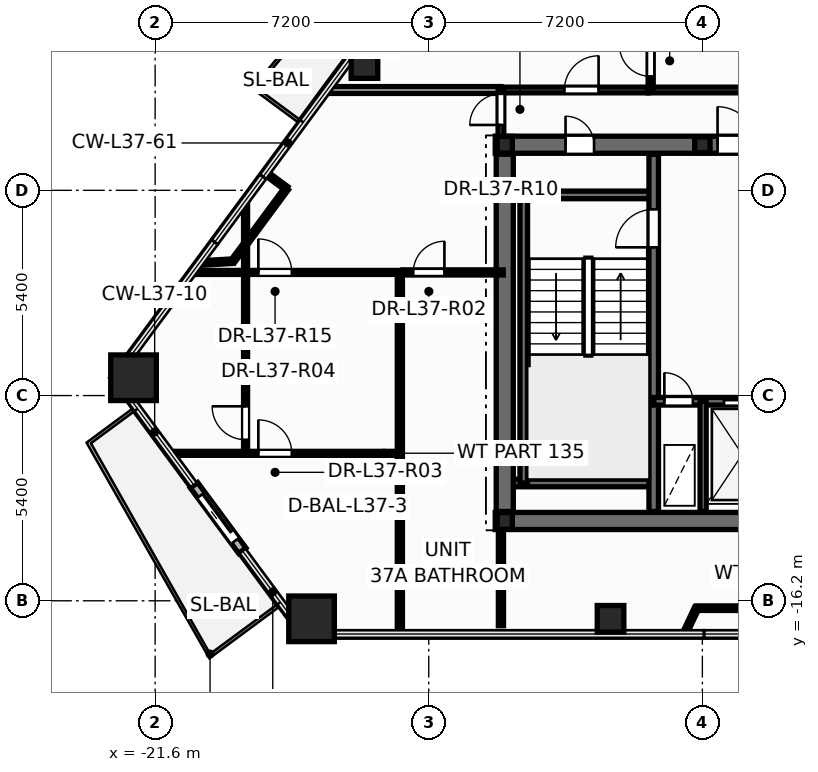
"""IFC4 building model, lengths in metres.
Left out: names, types, materials, properties, quantities, classifications, styles, units other than length and angle.
Written with IfcOpenShell. Run it as: python <this file> out.ifc"""

import sys

from ifc_helpers import new_model, si_unit, direction, frame, frame_2d, origin, origin_2d, place, context, subcontext, project, spatial, rectangle, hollow_rectangle, hollow_circle, i_section, extrude, element, fill, save


model = new_model("IFC4")
c1 = context("Model", 3, precision=1e-05, world=origin(), true_north=direction((0.0, 1.0)))
c2 = subcontext(c1, "Body", "Model", "MODEL_VIEW")
j1 = project(units=[si_unit("LENGTHUNIT", "METRE"), si_unit("PLANEANGLEUNIT", "RADIAN")], contexts=[c1])
p1 = place(None, origin())
s1 = spatial("IfcSite", under=j1, at=p1, CompositionType="ELEMENT")
p2 = place(p1, origin())
s2 = spatial("IfcBuilding", under=s1, at=p2, CompositionType="ELEMENT")
p3 = place(p2, frame((0.0, 0.0, 143.7)))
s3 = spatial("IfcBuildingStorey", under=s2, at=p3, CompositionType="ELEMENT", Elevation=143.7)
for number, where, z_axis, x_axis in (
    (1, (-22.168, -10.331, 0.0), (0.0, 0.0, 1.0), (1.0, 0.0, 0.0)),
    (2, (-17.484, -16.674, 0.0), (0.0, 0.0, 1.0), (1.0, 0.0, 0.0)),
):
    element("IfcColumn", number, at=place(p3, frame(where, z_axis=z_axis, x_axis=x_axis)), inside=s3, PredefinedType="COLUMN", context=c2, shape_type="SweptSolid", body=[
        extrude(hollow_rectangle(XDim=1.2, YDim=1.2, WallThickness=0.055, at=origin_2d()), origin(), (0.0, 0.0, 1.0), 3.6),
    ])
for number, where, z_axis, x_axis in (
    (3, (-9.616, -16.674, 0.0), (0.0, 0.0, 1.0), (1.0, 0.0, 0.0)),
    (4, (-16.092, -2.103, 0.0), (0.0, 0.0, 1.0), (1.0, 0.0, 0.0)),
):
    element("IfcColumn", number, at=place(p3, frame(where, z_axis=z_axis, x_axis=x_axis)), inside=s3, PredefinedType="COLUMN", context=c2, shape_type="SweptSolid", body=[
        extrude(hollow_circle(Radius=0.35, WallThickness=0.03, at=origin_2d()), origin(), (0.0, 0.0, 1.0), 3.6),
    ])
for number, where, z_axis, x_axis in (
    (5, (-12.4, -14.1, 0.0), (0.0, 0.0, 1.0), (1.0, 0.0, 0.0)),
    (6, (-12.4, -4.2, 0.0), (0.0, 0.0, 1.0), (1.0, 0.0, 0.0)),
):
    element("IfcColumn", number, at=place(p3, frame(where, z_axis=z_axis, x_axis=x_axis)), inside=s3, PredefinedType="COLUMN", context=c2, shape_type="SweptSolid", body=[
        extrude(i_section(OverallWidth=0.4, OverallDepth=0.44, WebThickness=0.028, FlangeThickness=0.04, at=origin_2d()), origin(), (0.0, 0.0, 1.0), 3.6),
    ])
p4 = place(p3, frame((-7.2, -4.2, 0.0), z_axis=(0.0, 0.0, 1.0), x_axis=(1.0, 0.0, 0.0)))
e7 = element("IfcColumn", 7, at=p4, inside=s3, PredefinedType="PILASTER", context=c2, shape_type="SweptSolid", body=[
    extrude(i_section(OverallWidth=0.405, OverallDepth=0.414, WebThickness=0.022, FlangeThickness=0.032, at=origin_2d()), origin(), (0.0, 0.0, 1.0), 3.6),
])
p5 = place(p3, frame((-20.577, -13.159, -0.015), z_axis=(0.0, 0.0, 1.0), x_axis=(0.59407028248, -0.804413139794, 0.0)))
e8 = element("IfcWall", 8, at=p5, inside=s3, PredefinedType="STANDARD", context=c2, shape_type="SweptSolid", body=[
    extrude(rectangle(XDim=2.14, YDim=0.24, at=frame_2d((1.07, 0.0))), origin(), (0.0, 0.0, 1.0), 2.807),
])
p6 = place(p5, frame((0.32, 0.0, 0.015)))
e9 = element("IfcOpeningElement", 9, at=p6, cuts=e8, PredefinedType="OPENING", context=c2, shape_type="SweptSolid", body=[
    extrude(rectangle(XDim=1.506, YDim=2.204, at=frame_2d((0.75, 1.102))), frame((0.0, 0.13, 0.0), z_axis=(0.0, -1.0, 0.0), x_axis=(1.0, 0.0, 0.0)), (0.0, 0.0, 1.0), 0.26),
])
p7 = place(p3, frame((-12.65, -14.1, 0.0), z_axis=(0.0, 0.0, 1.0), x_axis=(1.0, 0.0, 0.0)))
e10 = element("IfcWall", 10, at=p7, inside=s3, PredefinedType="SHEAR", context=c2, shape_type="SweptSolid", body=[
    extrude(rectangle(XDim=25.3, YDim=0.45, at=frame_2d((12.65, 0.0))), origin(), (0.0, 0.0, 1.0), 3.6),
])
p8 = place(p3, frame((-12.65, -4.2, 0.0), z_axis=(0.0, 0.0, 1.0), x_axis=(1.0, 0.0, 0.0)))
e11 = element("IfcWall", 11, at=p8, inside=s3, PredefinedType="SHEAR", context=c2, shape_type="SweptSolid", body=[
    extrude(rectangle(XDim=25.3, YDim=0.45, at=frame_2d((12.65, 0.0))), origin(), (0.0, 0.0, 1.0), 3.6),
])
p9 = place(p8, frame((1.85, 0.0, 0.0)))
e12 = element("IfcOpeningElement", 12, at=p9, cuts=e11, PredefinedType="OPENING", context=c2, shape_type="SweptSolid", body=[
    extrude(rectangle(XDim=0.756, YDim=2.054, at=frame_2d((0.375, 1.027))), frame((0.0, 0.235, 0.0), z_axis=(0.0, -1.0, 0.0), x_axis=(1.0, 0.0, 0.0)), (0.0, 0.0, 1.0), 0.47),
])
p10 = place(p8, frame((21.85, 0.0, 0.0)))
e13 = element("IfcOpeningElement", 13, at=p10, cuts=e11, PredefinedType="OPENING", context=c2, shape_type="SweptSolid", body=[
    extrude(rectangle(XDim=0.756, YDim=2.054, at=frame_2d((0.375, 1.027))), frame((0.0, 0.235, 0.0), z_axis=(0.0, -1.0, 0.0), x_axis=(1.0, 0.0, 0.0)), (0.0, 0.0, 1.0), 0.47),
])
p11 = place(p8, frame((23.5, 0.0, 0.0)))
e14 = element("IfcOpeningElement", 14, at=p11, cuts=e11, PredefinedType="OPENING", context=c2, shape_type="SweptSolid", body=[
    extrude(rectangle(XDim=0.756, YDim=2.054, at=frame_2d((0.375, 1.027))), frame((0.0, 0.235, 0.0), z_axis=(0.0, -1.0, 0.0), x_axis=(1.0, 0.0, 0.0)), (0.0, 0.0, 1.0), 0.47),
])
p12 = place(p8, frame((5.85, 0.0, 0.0)))
e15 = element("IfcOpeningElement", 15, at=p12, cuts=e11, PredefinedType="OPENING", context=c2, shape_type="SweptSolid", body=[
    extrude(rectangle(XDim=1.006, YDim=2.104, at=frame_2d((0.5, 1.052))), frame((0.0, 0.235, 0.0), z_axis=(0.0, -1.0, 0.0), x_axis=(1.0, 0.0, 0.0)), (0.0, 0.0, 1.0), 0.47),
])
p13 = place(p8, frame((10.35, 0.0, 0.0)))
e16 = element("IfcOpeningElement", 16, at=p13, cuts=e11, PredefinedType="OPENING", context=c2, shape_type="SweptSolid", body=[
    extrude(rectangle(XDim=1.406, YDim=2.154, at=frame_2d((0.7, 1.077))), frame((0.0, 0.235, 0.0), z_axis=(0.0, -1.0, 0.0), x_axis=(1.0, 0.0, 0.0)), (0.0, 0.0, 1.0), 0.47),
])
p14 = place(p8, frame((18.45, 0.0, 0.0)))
e17 = element("IfcOpeningElement", 17, at=p14, cuts=e11, PredefinedType="OPENING", context=c2, shape_type="SweptSolid", body=[
    extrude(rectangle(XDim=1.006, YDim=2.104, at=frame_2d((0.5, 1.052))), frame((0.0, 0.235, 0.0), z_axis=(0.0, -1.0, 0.0), x_axis=(1.0, 0.0, 0.0)), (0.0, 0.0, 1.0), 0.47),
])
for number, where, z_axis, x_axis in (
    (18, (-12.35, -5.52, 0.0), (0.0, 0.0, 1.0), (1.0, 0.0, 0.0)),
    (19, (-12.35, -13.1, 0.0), (0.0, 0.0, 1.0), (1.0, 0.0, 0.0)),
):
    element("IfcWall", number, at=place(p3, frame(where, z_axis=z_axis, x_axis=x_axis)), inside=s3, PredefinedType="SOLIDWALL", context=c2, shape_type="SweptSolid", body=[
        extrude(rectangle(XDim=3.87, YDim=0.2, at=frame_2d((1.935, 0.0))), origin(), (0.0, 0.0, 1.0), 3.6),
    ])
p15 = place(p3, frame((-11.9, -13.1, 0.0), z_axis=(0.0, 0.0, 1.0), x_axis=(0.0, 1.0, 0.0)))
e20 = element("IfcWall", 20, at=p15, inside=s3, PredefinedType="SOLIDWALL", context=c2, shape_type="SweptSolid", body=[
    extrude(rectangle(XDim=7.58, YDim=0.2, at=frame_2d((3.79, 0.0))), origin(), (0.0, 0.0, 1.0), 3.6),
])
p16 = place(p3, frame((-8.48, -13.85, 0.0), z_axis=(0.0, 0.0, 1.0), x_axis=(0.0, 1.0, 0.0)))
e21 = element("IfcWall", 21, at=p16, inside=s3, PredefinedType="SHEAR", context=c2, shape_type="SweptSolid", body=[
    extrude(rectangle(XDim=9.4, YDim=0.25, at=frame_2d((4.7, 0.0))), origin(), (0.0, 0.0, 1.0), 3.6),
])
p17 = place(p16, frame((6.95, 0.0, 0.0)))
e22 = element("IfcOpeningElement", 22, at=p17, cuts=e21, PredefinedType="OPENING", context=c2, shape_type="SweptSolid", body=[
    extrude(rectangle(XDim=1.006, YDim=2.104, at=frame_2d((0.5, 1.052))), frame((0.0, 0.135, 0.0), z_axis=(0.0, -1.0, 0.0), x_axis=(1.0, 0.0, 0.0)), (0.0, 0.0, 1.0), 0.27),
])
p18 = place(p3, frame((-8.48, -10.95, 0.0), z_axis=(0.0, 0.0, 1.0), x_axis=(1.0, 0.0, 0.0)))
e23 = element("IfcWall", 23, at=p18, inside=s3, PredefinedType="SOLIDWALL", context=c2, shape_type="SweptSolid", body=[
    extrude(rectangle(XDim=3.36, YDim=0.2, at=frame_2d((1.68, 0.0))), origin(), (0.0, 0.0, 1.0), 3.6),
])
p19 = place(p18, frame((0.28, 0.0, 0.0)))
e24 = element("IfcOpeningElement", 24, at=p19, cuts=e23, PredefinedType="OPENING", context=c2, shape_type="SweptSolid", body=[
    extrude(rectangle(XDim=0.756, YDim=2.054, at=frame_2d((0.375, 1.027))), frame((0.0, 0.11, 0.0), z_axis=(0.0, -1.0, 0.0), x_axis=(1.0, 0.0, 0.0)), (0.0, 0.0, 1.0), 0.22),
])
p20 = place(p18, frame((1.85, 0.0, 0.0)))
e25 = element("IfcOpeningElement", 25, at=p20, cuts=e23, PredefinedType="OPENING", context=c2, shape_type="SweptSolid", body=[
    extrude(rectangle(XDim=1.106, YDim=2.104, at=frame_2d((0.55, 1.052))), frame((0.0, 0.11, 0.0), z_axis=(0.0, -1.0, 0.0), x_axis=(1.0, 0.0, 0.0)), (0.0, 0.0, 1.0), 0.22),
])
p21 = place(p3, frame((-7.18, -13.85, 0.0), z_axis=(0.0, 0.0, 1.0), x_axis=(0.0, 1.0, 0.0)))
e26 = element("IfcWall", 26, at=p21, inside=s3, PredefinedType="PARTITIONING", context=c2, shape_type="SweptSolid", body=[
    extrude(rectangle(XDim=2.9, YDim=0.16, at=frame_2d((1.45, 0.0))), origin(), (0.0, 0.0, 1.0), 2.475),
])
p22 = place(p3, frame((-12.4, -13.85, 0.0), z_axis=(0.0, 0.0, 1.0), x_axis=(0.0, 1.0, 0.0)))
e27 = element("IfcWall", 27, at=p22, inside=s3, PredefinedType="SHEAR", context=c2, shape_type="SweptSolid", body=[
    extrude(rectangle(XDim=9.4, YDim=0.45, at=frame_2d((4.7, 0.0))), origin(), (0.0, 0.0, 1.0), 3.6),
])
p23 = place(p3, frame((-8.62, -2.76, 0.0), z_axis=(0.0, 0.0, 1.0), x_axis=(1.0, 0.0, 0.0)))
e28 = element("IfcWall", 28, at=p23, inside=s3, PredefinedType="PARTITIONING", context=c2, shape_type="SweptSolid", body=[
    extrude(rectangle(XDim=9.26, YDim=0.15, at=frame_2d((4.63, 0.0))), origin(), (0.0, 0.0, 1.0), 2.325),
])
p24 = place(p3, frame((-19.22, -12.32, 0.0), z_axis=(0.0, 0.0, 1.0), x_axis=(0.0, 1.0, 0.0)))
e29 = element("IfcWall", 29, at=p24, inside=s3, PredefinedType="PARTITIONING", context=c2, shape_type="SweptSolid", body=[
    extrude(rectangle(XDim=6.654, YDim=0.105, at=frame_2d((3.327, 0.0))), origin(), (0.0, 0.0, 1.0), 2.325),
])
p25 = place(p24, frame((0.357, 0.0, 0.0)))
e30 = element("IfcOpeningElement", 30, at=p25, cuts=e29, PredefinedType="OPENING", context=c2, shape_type="SweptSolid", body=[
    extrude(rectangle(XDim=0.886, YDim=2.104, at=frame_2d((0.44, 1.052))), frame((0.0, 0.062, 0.0), z_axis=(0.0, -1.0, 0.0), x_axis=(1.0, 0.0, 0.0)), (0.0, 0.0, 1.0), 0.125),
])
p26 = place(p3, frame((-21.197, -12.32, 0.0), z_axis=(0.0, 0.0, 1.0), x_axis=(1.0, 0.0, 0.0)))
e31 = element("IfcWall", 31, at=p26, inside=s3, PredefinedType="PARTITIONING", context=c2, shape_type="SweptSolid", body=[
    extrude(rectangle(XDim=6.037, YDim=0.105, at=frame_2d((3.019, 0.0))), origin(), (0.0, 0.0, 1.0), 2.792),
])
p27 = place(p26, frame((2.313, 0.0, 0.0)))
e32 = element("IfcOpeningElement", 32, at=p27, cuts=e31, PredefinedType="OPENING", context=c2, shape_type="SweptSolid", body=[
    extrude(rectangle(XDim=0.886, YDim=2.104, at=frame_2d((0.44, 1.052))), frame((0.0, 0.062, 0.0), z_axis=(0.0, -1.0, 0.0), x_axis=(1.0, 0.0, 0.0)), (0.0, 0.0, 1.0), 0.125),
])
p28 = place(p3, frame((-20.619, -7.56, 0.0), z_axis=(0.0, 0.0, 1.0), x_axis=(1.0, 0.0, 0.0)))
e33 = element("IfcWall", 33, at=p28, inside=s3, PredefinedType="PARTITIONING", context=c2, shape_type="SweptSolid", body=[
    extrude(rectangle(XDim=5.539, YDim=0.105, at=frame_2d((2.77, 0.0))), origin(), (0.0, 0.0, 1.0), 2.325),
])
p29 = place(p28, frame((1.735, 0.0, 0.0)))
e34 = element("IfcOpeningElement", 34, at=p29, cuts=e33, PredefinedType="OPENING", context=c2, shape_type="SweptSolid", body=[
    extrude(rectangle(XDim=0.886, YDim=2.104, at=frame_2d((0.44, 1.052))), frame((0.0, 0.062, 0.0), z_axis=(0.0, -1.0, 0.0), x_axis=(1.0, 0.0, 0.0)), (0.0, 0.0, 1.0), 0.125),
])
p30 = place(p3, frame((-15.16, -17.074, 0.0), z_axis=(0.0, 0.0, 1.0), x_axis=(0.0, 1.0, 0.0)))
e35 = element("IfcWall", 35, at=p30, inside=s3, PredefinedType="PARTITIONING", context=c2, shape_type="SweptSolid", body=[
    extrude(rectangle(XDim=9.514, YDim=0.135, at=frame_2d((4.757, 0.0))), origin(), (0.0, 0.0, 1.0), 2.792),
])
p31 = place(p3, frame((-17.074, -2.76, 0.0), z_axis=(0.0, 0.0, 1.0), x_axis=(1.0, 0.0, 0.0)))
e36 = element("IfcWall", 36, at=p31, inside=s3, PredefinedType="PARTITIONING", context=c2, shape_type="SweptSolid", body=[
    extrude(rectangle(XDim=4.574, YDim=0.18, at=frame_2d((2.287, 0.0))), origin(), (0.0, 0.0, 1.0), 2.792),
])
p32 = place(p3, frame((-7.353, -16.394, 0.0), z_axis=(0.0, 0.0, 1.0), x_axis=(1.0, 0.0, 0.0)))
e37 = element("IfcWall", 37, at=p32, inside=s3, PredefinedType="PARTITIONING", context=c2, shape_type="SweptSolid", body=[
    extrude(rectangle(XDim=4.283, YDim=0.12, at=frame_2d((2.142, 0.0))), origin(), (0.0, 0.0, 1.0), 3.35),
])
p33 = place(p3, frame((-12.5, -2.76, 0.0), z_axis=(0.0, 0.0, 1.0), x_axis=(1.0, 0.0, 0.0)))
e38 = element("IfcWall", 38, at=p33, inside=s3, PredefinedType="PARTITIONING", context=c2, shape_type="SweptSolid", body=[
    extrude(rectangle(XDim=3.878, YDim=0.15, at=frame_2d((1.939, 0.0))), origin(), (0.0, 0.0, 1.0), 3.35),
])
p34 = place(p33, frame((1.669, 0.0, 0.0)))
e39 = element("IfcOpeningElement", 39, at=p34, cuts=e38, PredefinedType="OPENING", context=c2, shape_type="SweptSolid", body=[
    extrude(rectangle(XDim=0.906, YDim=2.104, at=frame_2d((0.45, 1.052))), frame((0.0, 0.085, 0.0), z_axis=(0.0, -1.0, 0.0), x_axis=(1.0, 0.0, 0.0)), (0.0, 0.0, 1.0), 0.17),
])
p35 = place(p3, frame((-8.56, -2.76, 0.0), z_axis=(0.0, 0.0, 1.0), x_axis=(0.0, 1.0, 0.0)))
e40 = element("IfcWall", 40, at=p35, inside=s3, PredefinedType="PARTITIONING", context=c2, shape_type="SweptSolid", body=[
    extrude(rectangle(XDim=2.92, YDim=0.135, at=frame_2d((1.46, 0.0))), origin(), (0.0, 0.0, 1.0), 3.35),
])
p36 = place(p35, frame((0.357, 0.0, 0.0)))
e41 = element("IfcOpeningElement", 41, at=p36, cuts=e40, PredefinedType="OPENING", context=c2, shape_type="SweptSolid", body=[
    extrude(rectangle(XDim=0.826, YDim=2.104, at=frame_2d((0.41, 1.052))), frame((0.0, 0.078, 0.0), z_axis=(0.0, -1.0, 0.0), x_axis=(1.0, 0.0, 0.0)), (0.0, 0.0, 1.0), 0.155),
])
p37 = place(p3, frame((-15.078, -7.56, 0.0), z_axis=(0.0, 0.0, 1.0), x_axis=(1.0, 0.0, 0.0)))
e42 = element("IfcWall", 42, at=p37, inside=s3, PredefinedType="PARTITIONING", context=c2, shape_type="SweptSolid", body=[
    extrude(rectangle(XDim=2.638, YDim=0.135, at=frame_2d((1.319, 0.0))), origin(), (0.0, 0.0, 1.0), 2.792),
])
p38 = place(p37, frame((0.271, 0.0, 0.0)))
e43 = element("IfcOpeningElement", 43, at=p38, cuts=e42, PredefinedType="OPENING", context=c2, shape_type="SweptSolid", body=[
    extrude(rectangle(XDim=0.826, YDim=2.104, at=frame_2d((0.41, 1.052))), frame((0.0, 0.078, 0.0), z_axis=(0.0, -1.0, 0.0), x_axis=(1.0, 0.0, 0.0)), (0.0, 0.0, 1.0), 0.155),
])
p39 = place(p3, frame((-18.142, -5.351, 0.0), z_axis=(0.0, 0.0, 1.0), x_axis=(-0.594168747529, -0.804340412674, 0.0)))
e44 = element("IfcWall", 44, at=p39, inside=s3, PredefinedType="PARTITIONING", context=c2, shape_type="SweptSolid", body=[
    extrude(rectangle(XDim=2.378, YDim=0.12, at=frame_2d((1.189, 0.0))), origin(), (0.0, 0.0, 1.0), 3.35),
])
p40 = place(p3, frame((-12.5, -4.24, 0.0), z_axis=(0.0, 0.0, 1.0), x_axis=(0.0, 1.0, 0.0)))
e45 = element("IfcWall", 45, at=p40, inside=s3, PredefinedType="PARTITIONING", context=c2, shape_type="SweptSolid", body=[
    extrude(rectangle(XDim=1.48, YDim=0.15, at=frame_2d((0.74, 0.0))), origin(), (0.0, 0.0, 1.0), 2.325),
])
p41 = place(p40, frame((0.56, 0.0, 0.0)))
e46 = element("IfcOpeningElement", 46, at=p41, cuts=e45, PredefinedType="OPENING", context=c2, shape_type="SweptSolid", body=[
    extrude(rectangle(XDim=0.826, YDim=2.104, at=frame_2d((0.41, 1.052))), frame((0.0, 0.085, 0.0), z_axis=(0.0, -1.0, 0.0), x_axis=(1.0, 0.0, 0.0)), (0.0, 0.0, 1.0), 0.17),
])
p42 = place(p3, frame((-19.555, -7.264, 0.0), z_axis=(0.0, 0.0, 1.0), x_axis=(-0.998331873932, -0.057736206072, 0.0)))
e47 = element("IfcWall", 47, at=p42, inside=s3, PredefinedType="PARTITIONING", context=c2, shape_type="SweptSolid", body=[
    extrude(rectangle(XDim=0.871, YDim=0.12, at=frame_2d((0.436, 0.0))), origin(), (0.0, 0.0, 1.0), 2.792),
])
p43 = place(p3, frame((-7.668, -17.064, 0.0), z_axis=(0.0, 0.0, 1.0), x_axis=(0.425860530217, 0.904788820004, 0.0)))
e48 = element("IfcWall", 48, at=p43, inside=s3, PredefinedType="PARTITIONING", context=c2, shape_type="SweptSolid", body=[
    extrude(rectangle(XDim=0.741, YDim=0.12, at=frame_2d((0.37, 0.0))), origin(), (0.0, 0.0, 1.0), 2.792),
])
p44 = place(p3, frame((-18.681, -4.953, 0.0), z_axis=(0.0, 0.0, 1.0), x_axis=(0.804221577226, -0.594329584257, 0.0)))
e49 = element("IfcWall", 49, at=p44, inside=s3, PredefinedType="PARTITIONING", context=c2, shape_type="SweptSolid", body=[
    extrude(rectangle(XDim=0.67, YDim=0.12, at=frame_2d((0.335, 0.0))), origin(), (0.0, 0.0, 1.0), 2.792),
])
p45 = place(p3, frame((-12.5, -14.4, 0.0), z_axis=(0.0, 0.0, 1.0), x_axis=(0.0, -1.0, 0.0)))
e50 = element("IfcWall", 50, at=p45, inside=s3, PredefinedType="PARTITIONING", context=c2, shape_type="SweptSolid", body=[
    extrude(rectangle(XDim=2.455, YDim=0.135, at=frame_2d((1.227, 0.0))), origin(), (0.0, 0.0, 1.0), 2.792),
])
p46 = place(p6, origin())
e51 = element("IfcDoor", 51, at=p46, inside=s3, OperationType="SLIDING_TO_RIGHT", PredefinedType="DOOR", context=c2, shape_type="SweptSolid", body=[
    extrude(rectangle(XDim=1.5, YDim=2.2, at=frame_2d((0.75, 1.1))), frame((0.0, 0.025, 0.0), z_axis=(0.0, -1.0, 0.0), x_axis=(1.0, 0.0, 0.0)), (0.0, 0.0, 1.0), 0.05),
])
fill(e9, e51)
p47 = place(p17, origin())
e52 = element("IfcDoor", 52, at=p47, inside=s3, OperationType="SINGLE_SWING_LEFT", PredefinedType="DOOR", context=c2, shape_type="SweptSolid", body=[
    extrude(rectangle(XDim=1.0, YDim=2.1, at=frame_2d((0.5, 1.05))), frame((0.0, 0.025, 0.0), z_axis=(0.0, -1.0, 0.0), x_axis=(1.0, 0.0, 0.0)), (0.0, 0.0, 1.0), 0.05),
])
fill(e22, e52)
p48 = place(p19, origin())
e53 = element("IfcDoor", 53, at=p48, inside=s3, OperationType="SINGLE_SWING_LEFT", PredefinedType="DOOR", context=c2, shape_type="SweptSolid", body=[
    extrude(rectangle(XDim=0.75, YDim=2.05, at=frame_2d((0.375, 1.025))), frame((0.0, 0.025, 0.0), z_axis=(0.0, -1.0, 0.0), x_axis=(1.0, 0.0, 0.0)), (0.0, 0.0, 1.0), 0.05),
])
fill(e24, e53)
p49 = place(p20, origin())
e54 = element("IfcDoor", 54, at=p49, inside=s3, OperationType="DOUBLE_DOOR_SLIDING", PredefinedType="DOOR", context=c2, shape_type="SweptSolid", body=[
    extrude(rectangle(XDim=1.1, YDim=2.1, at=frame_2d((0.55, 1.05))), frame((0.0, 0.025, 0.0), z_axis=(0.0, -1.0, 0.0), x_axis=(1.0, 0.0, 0.0)), (0.0, 0.0, 1.0), 0.05),
])
fill(e25, e54)
p50 = place(p9, origin())
e55 = element("IfcDoor", 55, at=p50, inside=s3, OperationType="SINGLE_SWING_LEFT", PredefinedType="DOOR", context=c2, shape_type="SweptSolid", body=[
    extrude(rectangle(XDim=0.75, YDim=2.05, at=frame_2d((0.375, 1.025))), frame((0.0, 0.025, 0.0), z_axis=(0.0, -1.0, 0.0), x_axis=(1.0, 0.0, 0.0)), (0.0, 0.0, 1.0), 0.05),
])
fill(e12, e55)
p51 = place(p12, origin())
e56 = element("IfcDoor", 56, at=p51, inside=s3, OperationType="SINGLE_SWING_LEFT", PredefinedType="DOOR", context=c2, shape_type="SweptSolid", body=[
    extrude(rectangle(XDim=1.0, YDim=2.1, at=frame_2d((0.5, 1.05))), frame((0.0, 0.025, 0.0), z_axis=(0.0, -1.0, 0.0), x_axis=(1.0, 0.0, 0.0)), (0.0, 0.0, 1.0), 0.05),
])
fill(e15, e56)
p52 = place(p41, origin())
e57 = element("IfcDoor", 57, at=p52, inside=s3, OperationType="SINGLE_SWING_LEFT", PredefinedType="DOOR", context=c2, shape_type="SweptSolid", body=[
    extrude(rectangle(XDim=0.82, YDim=2.1, at=frame_2d((0.41, 1.05))), frame((0.0, 0.025, 0.0), z_axis=(0.0, -1.0, 0.0), x_axis=(1.0, 0.0, 0.0)), (0.0, 0.0, 1.0), 0.05),
])
fill(e46, e57)
p53 = place(p38, origin())
e58 = element("IfcDoor", 58, at=p53, inside=s3, OperationType="SINGLE_SWING_RIGHT", PredefinedType="DOOR", context=c2, shape_type="SweptSolid", body=[
    extrude(rectangle(XDim=0.82, YDim=2.1, at=frame_2d((0.41, 1.05))), frame((0.0, 0.025, 0.0), z_axis=(0.0, -1.0, 0.0), x_axis=(1.0, 0.0, 0.0)), (0.0, 0.0, 1.0), 0.05),
])
fill(e43, e58)
p54 = place(p27, origin())
e59 = element("IfcDoor", 59, at=p54, inside=s3, OperationType="SINGLE_SWING_LEFT", PredefinedType="DOOR", context=c2, shape_type="SweptSolid", body=[
    extrude(rectangle(XDim=0.88, YDim=2.1, at=frame_2d((0.44, 1.05))), frame((0.0, 0.025, 0.0), z_axis=(0.0, -1.0, 0.0), x_axis=(1.0, 0.0, 0.0)), (0.0, 0.0, 1.0), 0.05),
])
fill(e32, e59)
p55 = place(p25, origin())
e60 = element("IfcDoor", 60, at=p55, inside=s3, OperationType="SINGLE_SWING_RIGHT", PredefinedType="DOOR", context=c2, shape_type="SweptSolid", body=[
    extrude(rectangle(XDim=0.88, YDim=2.1, at=frame_2d((0.44, 1.05))), frame((0.0, 0.025, 0.0), z_axis=(0.0, -1.0, 0.0), x_axis=(1.0, 0.0, 0.0)), (0.0, 0.0, 1.0), 0.05),
])
fill(e30, e60)
p56 = place(p36, origin())
e61 = element("IfcDoor", 61, at=p56, inside=s3, OperationType="SINGLE_SWING_RIGHT", PredefinedType="DOOR", context=c2, shape_type="SweptSolid", body=[
    extrude(rectangle(XDim=0.82, YDim=2.1, at=frame_2d((0.41, 1.05))), frame((0.0, 0.025, 0.0), z_axis=(0.0, -1.0, 0.0), x_axis=(1.0, 0.0, 0.0)), (0.0, 0.0, 1.0), 0.05),
])
fill(e41, e61)
p57 = place(p34, origin())
e62 = element("IfcDoor", 62, at=p57, inside=s3, OperationType="SINGLE_SWING_RIGHT", PredefinedType="DOOR", context=c2, shape_type="SweptSolid", body=[
    extrude(rectangle(XDim=0.9, YDim=2.1, at=frame_2d((0.45, 1.05))), frame((0.0, 0.025, 0.0), z_axis=(0.0, -1.0, 0.0), x_axis=(1.0, 0.0, 0.0)), (0.0, 0.0, 1.0), 0.05),
])
fill(e39, e62)
p58 = place(p29, origin())
e63 = element("IfcDoor", 63, at=p58, inside=s3, OperationType="SINGLE_SWING_LEFT", PredefinedType="DOOR", context=c2, shape_type="SweptSolid", body=[
    extrude(rectangle(XDim=0.88, YDim=2.1, at=frame_2d((0.44, 1.05))), frame((0.0, 0.025, 0.0), z_axis=(0.0, -1.0, 0.0), x_axis=(1.0, 0.0, 0.0)), (0.0, 0.0, 1.0), 0.05),
])
fill(e34, e63)
save(model, sys.argv[1])
